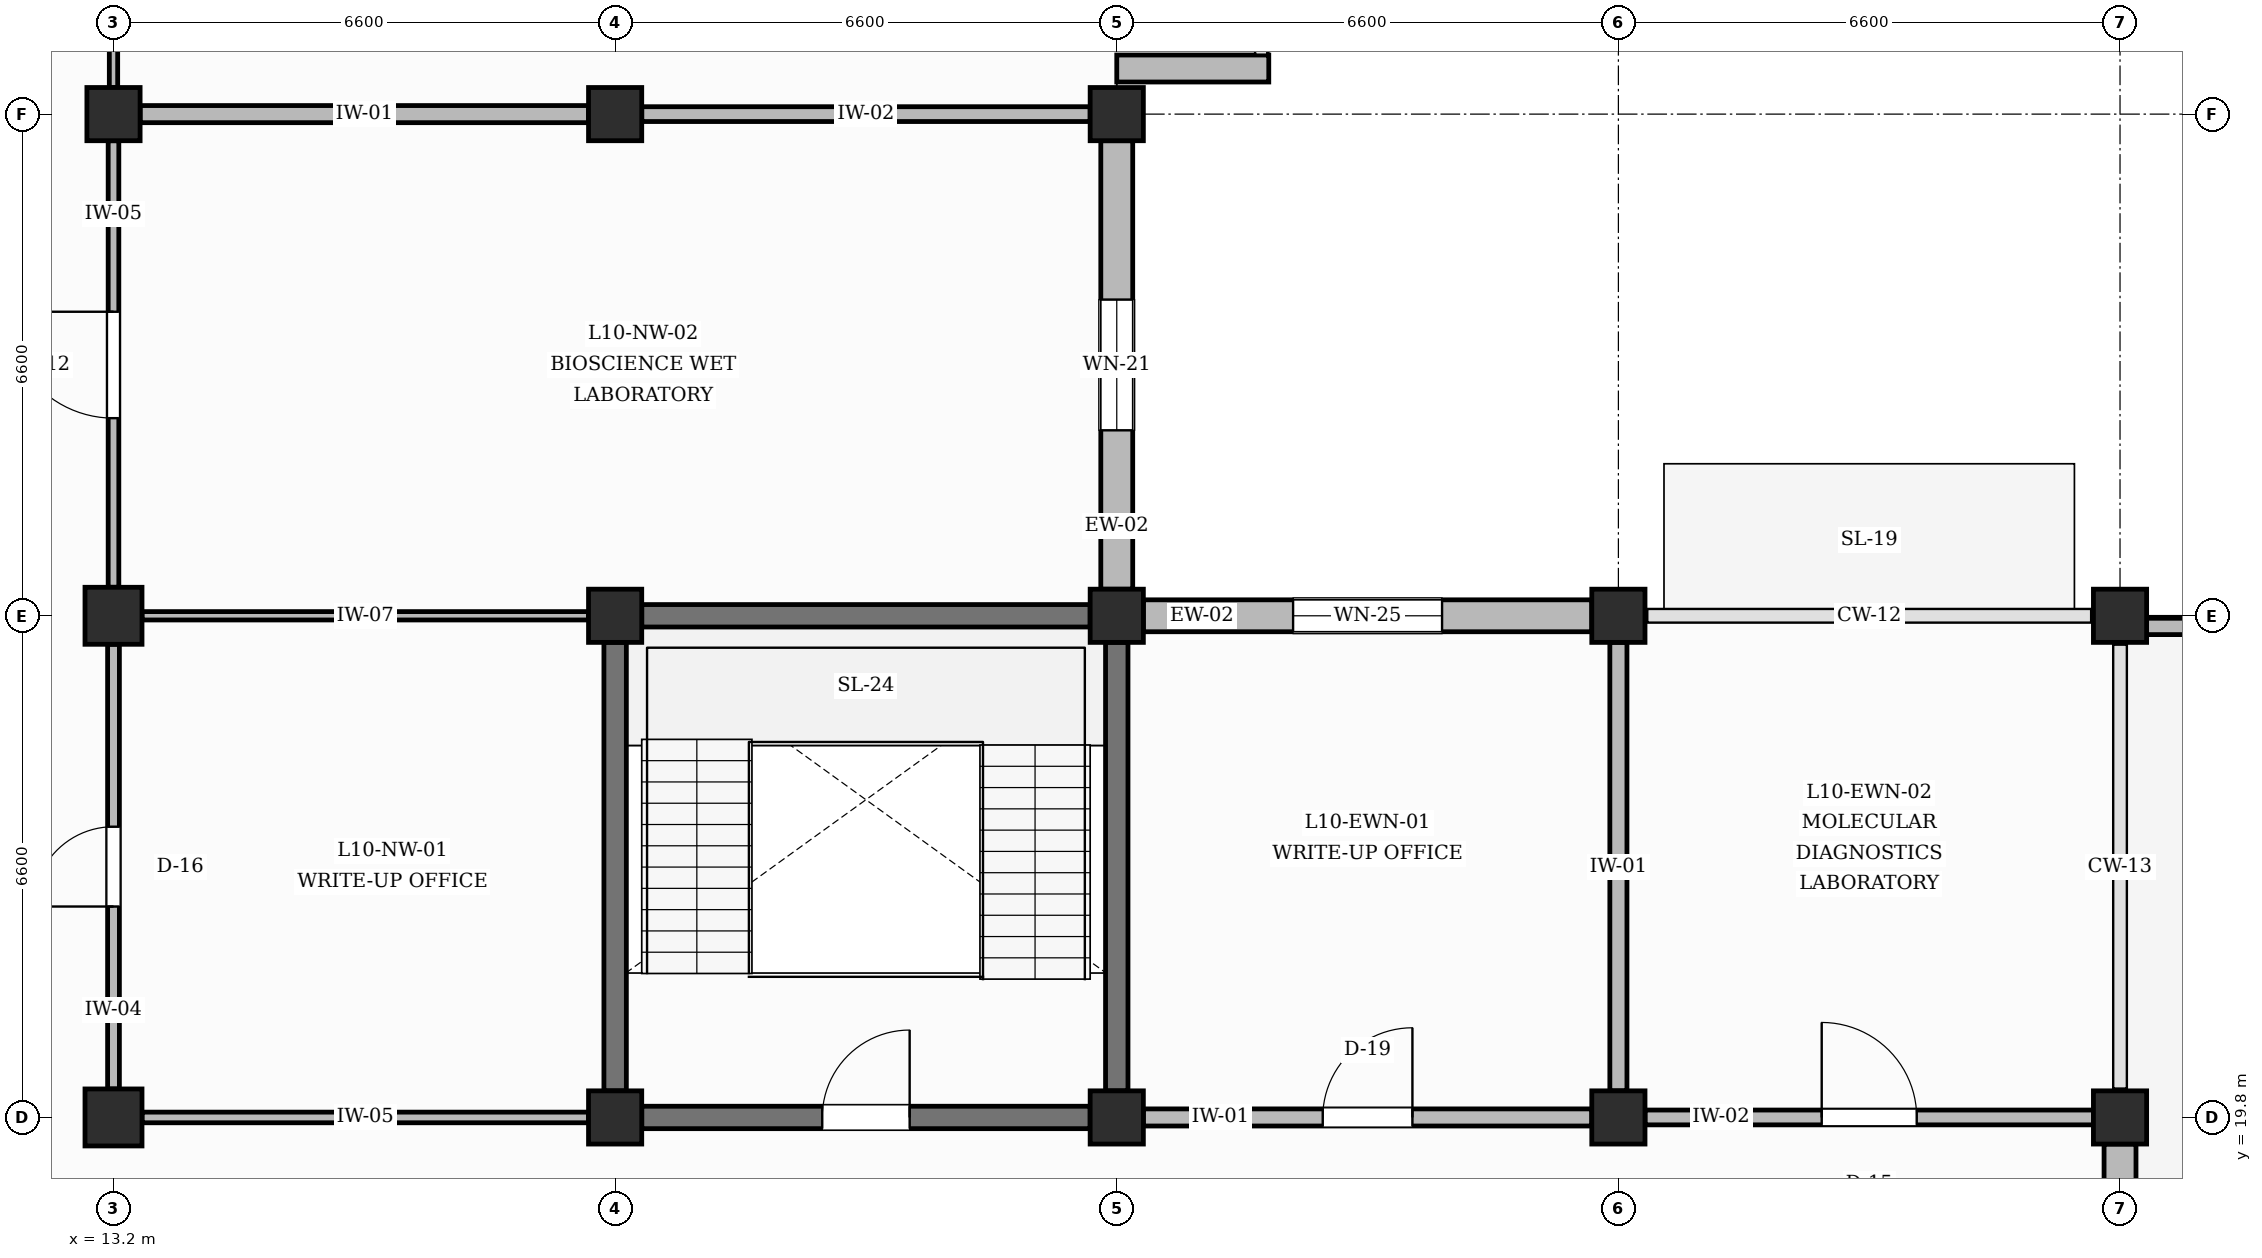
"""IFC4 building model, lengths in metres.
Left out: names, types, materials, properties, quantities, classifications, styles, units other than length and angle.
Written with IfcOpenShell. Run it as: python <this file> out.ifc"""

import sys

from ifc_helpers import new_model, si_unit, direction, frame, frame_2d, origin, origin_2d, place, context, subcontext, project, spatial, rectangle, extrude, element, fill, save


model = new_model("IFC4")
c1 = context("Model", 3, precision=1e-05, world=origin(), true_north=direction((0.0, 1.0)))
c2 = subcontext(c1, "Body", "Model", "MODEL_VIEW")
j1 = project(units=[si_unit("LENGTHUNIT", "METRE"), si_unit("PLANEANGLEUNIT", "RADIAN")], contexts=[c1])
p1 = place(None, origin())
s1 = spatial("IfcSite", under=j1, at=p1, CompositionType="ELEMENT")
p2 = place(p1, origin())
s2 = spatial("IfcBuilding", under=s1, at=p2, CompositionType="ELEMENT")
p3 = place(p2, frame((0.0, 0.0, 43.8)))
s3 = spatial("IfcBuildingStorey", under=s2, at=p3, CompositionType="ELEMENT", Elevation=43.8)
for number, where, z_axis, x_axis in (
    (1, (13.2, 19.8, 0.0), (0.0, 0.0, 1.0), (1.0, 0.0, 0.0)),
    (2, (13.2, 26.4, 0.0), (0.0, 0.0, 1.0), (1.0, 0.0, 0.0)),
):
    element("IfcColumn", number, at=place(p3, frame(where, z_axis=z_axis, x_axis=x_axis)), inside=s3, PredefinedType="COLUMN", context=c2, shape_type="SweptSolid", body=[
        extrude(rectangle(XDim=0.75, YDim=0.75, at=origin_2d()), origin(), (0.0, 0.0, 1.0), 4.2),
    ])
for number, where, z_axis, x_axis in (
    (3, (13.2, 33.0, 0.0), (0.0, 0.0, 1.0), (1.0, 0.0, 0.0)),
    (4, (19.8, 19.8, 0.0), (0.0, 0.0, 1.0), (1.0, 0.0, 0.0)),
    (5, (19.8, 26.4, 0.0), (0.0, 0.0, 1.0), (1.0, 0.0, 0.0)),
    (6, (19.8, 33.0, 0.0), (0.0, 0.0, 1.0), (1.0, 0.0, 0.0)),
    (7, (26.4, 19.8, 0.0), (0.0, 0.0, 1.0), (1.0, 0.0, 0.0)),
    (8, (26.4, 26.4, 0.0), (0.0, 0.0, 1.0), (1.0, 0.0, 0.0)),
    (9, (26.4, 33.0, 0.0), (0.0, 0.0, 1.0), (1.0, 0.0, 0.0)),
    (10, (33.0, 19.8, 0.0), (0.0, 0.0, 1.0), (1.0, 0.0, 0.0)),
    (11, (33.0, 26.4, 0.0), (0.0, 0.0, 1.0), (1.0, 0.0, 0.0)),
    (12, (39.6, 19.8, 0.0), (0.0, 0.0, 1.0), (1.0, 0.0, 0.0)),
    (13, (39.6, 26.4, 0.0), (0.0, 0.0, 1.0), (1.0, 0.0, 0.0)),
):
    element("IfcColumn", number, at=place(p3, frame(where, z_axis=z_axis, x_axis=x_axis)), inside=s3, PredefinedType="COLUMN", context=c2, shape_type="SweptSolid", body=[
        extrude(rectangle(XDim=0.7, YDim=0.7, at=origin_2d()), origin(), (0.0, 0.0, 1.0), 4.2),
    ])
p4 = place(p3, frame((26.4, 26.75, 0.0), z_axis=(0.0, 0.0, 1.0), x_axis=(0.0, 1.0, 0.0)))
e14 = element("IfcWall", 14, at=p4, inside=s3, PredefinedType="SOLIDWALL", context=c2, shape_type="SweptSolid", body=[
    extrude(rectangle(XDim=5.9, YDim=0.42, at=frame_2d((2.95, 0.0))), origin(), (0.0, 0.0, 1.0), 3.29),
])
p5 = place(p4, frame((2.09, 0.0, 0.95)))
e15 = element("IfcOpeningElement", 15, at=p5, cuts=e14, PredefinedType="OPENING", context=c2, shape_type="SweptSolid", body=[
    extrude(rectangle(XDim=1.72, YDim=1.3, at=frame_2d((0.86, 0.65))), frame((0.0, 0.22, 0.0), z_axis=(0.0, -1.0, 0.0), x_axis=(1.0, 0.0, 0.0)), (0.0, 0.0, 1.0), 0.44),
])
p6 = place(p3, frame((26.4, 33.6, 0.0), z_axis=(0.0, 0.0, 1.0), x_axis=(1.0, 0.0, 0.0)))
e16 = element("IfcWall", 16, at=p6, inside=s3, PredefinedType="SOLIDWALL", context=c2, shape_type="SweptSolid", body=[
    extrude(rectangle(XDim=2.0, YDim=0.355, at=frame_2d((1.0, 0.0))), origin(), (0.0, 0.0, 1.0), 3.29),
])
p7 = place(p3, frame((26.75, 26.4, 0.0), z_axis=(0.0, 0.0, 1.0), x_axis=(1.0, 0.0, 0.0)))
e17 = element("IfcWall", 17, at=p7, inside=s3, PredefinedType="SOLIDWALL", context=c2, shape_type="SweptSolid", body=[
    extrude(rectangle(XDim=5.9, YDim=0.42, at=frame_2d((2.95, 0.0))), origin(), (0.0, 0.0, 1.0), 3.29),
])
p8 = place(p7, frame((1.97, 0.0, 0.95)))
e18 = element("IfcOpeningElement", 18, at=p8, cuts=e17, PredefinedType="OPENING", context=c2, shape_type="SweptSolid", body=[
    extrude(rectangle(XDim=1.96, YDim=1.3, at=frame_2d((0.98, 0.65))), frame((0.0, 0.22, 0.0), z_axis=(0.0, -1.0, 0.0), x_axis=(1.0, 0.0, 0.0)), (0.0, 0.0, 1.0), 0.44),
])
p9 = place(p3, frame((39.6, 13.55, 0.0), z_axis=(0.0, 0.0, 1.0), x_axis=(0.0, 1.0, 0.0)))
e19 = element("IfcWall", 19, at=p9, inside=s3, PredefinedType="SOLIDWALL", context=c2, shape_type="SweptSolid", body=[
    extrude(rectangle(XDim=5.9, YDim=0.42, at=frame_2d((2.95, 0.0))), origin(), (0.0, 0.0, 1.0), 3.29),
])
p10 = place(p9, frame((1.97, 0.0, 0.95)))
e20 = element("IfcOpeningElement", 20, at=p10, cuts=e19, PredefinedType="OPENING", context=c2, shape_type="SweptSolid", body=[
    extrude(rectangle(XDim=1.96, YDim=1.74, at=frame_2d((0.98, 0.87))), frame((0.0, 0.22, 0.0), z_axis=(0.0, -1.0, 0.0), x_axis=(1.0, 0.0, 0.0)), (0.0, 0.0, 1.0), 0.44),
])
p11 = place(p3, frame((39.74, 26.26, 0.0), z_axis=(0.0, 0.0, 1.0), x_axis=(1.0, 0.0, 0.0)))
e21 = element("IfcWall", 21, at=p11, inside=s3, PredefinedType="PARAPET", context=c2, shape_type="SweptSolid", body=[
    extrude(rectangle(XDim=6.32, YDim=0.215, at=frame_2d((3.16, 0.0))), origin(), (0.0, 0.0, 1.0), 1.15),
])
p12 = place(p3, frame((20.15, 19.8, 0.0), z_axis=(0.0, 0.0, 1.0), x_axis=(1.0, 0.0, 0.0)))
e22 = element("IfcWall", 22, at=p12, inside=s3, PredefinedType="SHEAR", context=c2, shape_type="SweptSolid", body=[
    extrude(rectangle(XDim=5.9, YDim=0.295, at=frame_2d((2.95, 0.0))), origin(), (0.0, 0.0, 1.0), 3.29),
])
p13 = place(p12, frame((2.375, 0.0, 0.0)))
e23 = element("IfcOpeningElement", 23, at=p13, cuts=e22, PredefinedType="OPENING", context=c2, shape_type="SweptSolid", body=[
    extrude(rectangle(XDim=1.15, YDim=2.2, at=frame_2d((0.575, 1.1))), frame((0.0, 0.157, 0.0), z_axis=(0.0, -1.0, 0.0), x_axis=(1.0, 0.0, 0.0)), (0.0, 0.0, 1.0), 0.315),
])
for number, where, z_axis, x_axis in (
    (24, (20.15, 26.4, 0.0), (0.0, 0.0, 1.0), (1.0, 0.0, 0.0)),
    (25, (19.8, 20.15, 0.0), (0.0, 0.0, 1.0), (0.0, 1.0, 0.0)),
    (26, (26.4, 20.15, 0.0), (0.0, 0.0, 1.0), (0.0, 1.0, 0.0)),
):
    element("IfcWall", number, at=place(p3, frame(where, z_axis=z_axis, x_axis=x_axis)), inside=s3, PredefinedType="SHEAR", context=c2, shape_type="SweptSolid", body=[
        extrude(rectangle(XDim=5.9, YDim=0.295, at=frame_2d((2.95, 0.0))), origin(), (0.0, 0.0, 1.0), 3.29),
    ])
p14 = place(p3, frame((13.2, 20.175, 0.0), z_axis=(0.0, 0.0, 1.0), x_axis=(0.0, 1.0, 0.0)))
e27 = element("IfcWall", 27, at=p14, inside=s3, PredefinedType="PARTITIONING", context=c2, shape_type="SweptSolid", body=[
    extrude(rectangle(XDim=5.85, YDim=0.155, at=frame_2d((2.925, 0.0))), origin(), (0.0, 0.0, 1.0), 3.29),
])
p15 = place(p14, frame((2.4, 0.0, 0.0)))
e28 = element("IfcOpeningElement", 28, at=p15, cuts=e27, PredefinedType="OPENING", context=c2, shape_type="SweptSolid", body=[
    extrude(rectangle(XDim=1.05, YDim=2.15, at=frame_2d((0.525, 1.075))), frame((0.0, 0.087, 0.0), z_axis=(0.0, -1.0, 0.0), x_axis=(1.0, 0.0, 0.0)), (0.0, 0.0, 1.0), 0.175),
])
p16 = place(p3, frame((13.2, 26.775, 0.0), z_axis=(0.0, 0.0, 1.0), x_axis=(0.0, 1.0, 0.0)))
e29 = element("IfcWall", 29, at=p16, inside=s3, PredefinedType="PARTITIONING", context=c2, shape_type="SweptSolid", body=[
    extrude(rectangle(XDim=5.875, YDim=0.14, at=frame_2d((2.938, 0.0))), origin(), (0.0, 0.0, 1.0), 3.29),
])
p17 = place(p16, frame((2.225, 0.0, 0.0)))
e30 = element("IfcOpeningElement", 30, at=p17, cuts=e29, PredefinedType="OPENING", context=c2, shape_type="SweptSolid", body=[
    extrude(rectangle(XDim=1.4, YDim=2.25, at=frame_2d((0.7, 1.125))), frame((0.0, 0.08, 0.0), z_axis=(0.0, -1.0, 0.0), x_axis=(1.0, 0.0, 0.0)), (0.0, 0.0, 1.0), 0.16),
])
p18 = place(p3, frame((13.2, 33.35, 0.0), z_axis=(0.0, 0.0, 1.0), x_axis=(0.0, 1.0, 0.0)))
e31 = element("IfcWall", 31, at=p18, inside=s3, PredefinedType="PARTITIONING", context=c2, shape_type="SweptSolid", body=[
    extrude(rectangle(XDim=5.9, YDim=0.11, at=frame_2d((2.95, 0.0))), origin(), (0.0, 0.0, 1.0), 3.29),
])
p19 = place(p18, frame((2.275, 0.0, 0.0)))
e32 = element("IfcOpeningElement", 32, at=p19, cuts=e31, PredefinedType="OPENING", context=c2, shape_type="SweptSolid", body=[
    extrude(rectangle(XDim=1.35, YDim=2.3, at=frame_2d((0.675, 1.15))), frame((0.0, 0.065, 0.0), z_axis=(0.0, -1.0, 0.0), x_axis=(1.0, 0.0, 0.0)), (0.0, 0.0, 1.0), 0.13),
])
p20 = place(p3, frame((13.575, 19.8, 0.0), z_axis=(0.0, 0.0, 1.0), x_axis=(1.0, 0.0, 0.0)))
e33 = element("IfcWall", 33, at=p20, inside=s3, PredefinedType="PARTITIONING", context=c2, shape_type="SweptSolid", body=[
    extrude(rectangle(XDim=5.875, YDim=0.14, at=frame_2d((2.938, 0.0))), origin(), (0.0, 0.0, 1.0), 3.29),
])
p21 = place(p3, frame((13.575, 26.4, 0.0), z_axis=(0.0, 0.0, 1.0), x_axis=(1.0, 0.0, 0.0)))
e34 = element("IfcWall", 34, at=p21, inside=s3, PredefinedType="PARTITIONING", context=c2, shape_type="SweptSolid", body=[
    extrude(rectangle(XDim=5.875, YDim=0.11, at=frame_2d((2.938, 0.0))), origin(), (0.0, 0.0, 1.0), 3.29),
])
p22 = place(p3, frame((13.55, 33.0, 0.0), z_axis=(0.0, 0.0, 1.0), x_axis=(1.0, 0.0, 0.0)))
e35 = element("IfcWall", 35, at=p22, inside=s3, PredefinedType="PARTITIONING", context=c2, shape_type="SweptSolid", body=[
    extrude(rectangle(XDim=5.9, YDim=0.225, at=frame_2d((2.95, 0.0))), origin(), (0.0, 0.0, 1.0), 3.29),
])
p23 = place(p3, frame((20.15, 33.0, 0.0), z_axis=(0.0, 0.0, 1.0), x_axis=(1.0, 0.0, 0.0)))
e36 = element("IfcWall", 36, at=p23, inside=s3, PredefinedType="PARTITIONING", context=c2, shape_type="SweptSolid", body=[
    extrude(rectangle(XDim=5.9, YDim=0.195, at=frame_2d((2.95, 0.0))), origin(), (0.0, 0.0, 1.0), 3.44),
])
p24 = place(p3, frame((26.75, 19.8, 0.0), z_axis=(0.0, 0.0, 1.0), x_axis=(1.0, 0.0, 0.0)))
e37 = element("IfcWall", 37, at=p24, inside=s3, PredefinedType="PARTITIONING", context=c2, shape_type="SweptSolid", body=[
    extrude(rectangle(XDim=5.9, YDim=0.225, at=frame_2d((2.95, 0.0))), origin(), (0.0, 0.0, 1.0), 3.29),
])
p25 = place(p24, frame((2.36, 0.0, 0.0)))
e38 = element("IfcOpeningElement", 38, at=p25, cuts=e37, PredefinedType="OPENING", context=c2, shape_type="SweptSolid", body=[
    extrude(rectangle(XDim=1.18, YDim=2.2, at=frame_2d((0.59, 1.1))), frame((0.0, 0.123, 0.0), z_axis=(0.0, -1.0, 0.0), x_axis=(1.0, 0.0, 0.0)), (0.0, 0.0, 1.0), 0.245),
])
p26 = place(p3, frame((33.0, 20.15, 0.0), z_axis=(0.0, 0.0, 1.0), x_axis=(0.0, 1.0, 0.0)))
e39 = element("IfcWall", 39, at=p26, inside=s3, PredefinedType="PARTITIONING", context=c2, shape_type="SweptSolid", body=[
    extrude(rectangle(XDim=5.9, YDim=0.225, at=frame_2d((2.95, 0.0))), origin(), (0.0, 0.0, 1.0), 3.29),
])
p27 = place(p3, frame((33.35, 19.8, 0.0), z_axis=(0.0, 0.0, 1.0), x_axis=(1.0, 0.0, 0.0)))
e40 = element("IfcWall", 40, at=p27, inside=s3, PredefinedType="PARTITIONING", context=c2, shape_type="SweptSolid", body=[
    extrude(rectangle(XDim=5.9, YDim=0.195, at=frame_2d((2.95, 0.0))), origin(), (0.0, 0.0, 1.0), 3.29),
])
p28 = place(p27, frame((2.325, 0.0, 0.0)))
e41 = element("IfcOpeningElement", 41, at=p28, cuts=e40, PredefinedType="OPENING", context=c2, shape_type="SweptSolid", body=[
    extrude(rectangle(XDim=1.25, YDim=2.25, at=frame_2d((0.625, 1.125))), frame((0.0, 0.107, 0.0), z_axis=(0.0, -1.0, 0.0), x_axis=(1.0, 0.0, 0.0)), (0.0, 0.0, 1.0), 0.215),
])
p29 = place(p5, origin())
e42 = element("IfcWindow", 42, at=p29, inside=s3, PartitioningType="DOUBLE_PANEL_VERTICAL", PredefinedType="WINDOW", context=c2, shape_type="SweptSolid", body=[
    extrude(rectangle(XDim=1.72, YDim=1.3, at=frame_2d((0.86, 0.65))), frame((0.0, 0.03, 0.0), z_axis=(0.0, -1.0, 0.0), x_axis=(1.0, 0.0, 0.0)), (0.0, 0.0, 1.0), 0.06),
])
fill(e15, e42)
p30 = place(p8, origin())
e43 = element("IfcWindow", 43, at=p30, inside=s3, PartitioningType="DOUBLE_PANEL_VERTICAL", PredefinedType="WINDOW", context=c2, shape_type="SweptSolid", body=[
    extrude(rectangle(XDim=1.96, YDim=1.3, at=frame_2d((0.98, 0.65))), frame((0.0, 0.03, 0.0), z_axis=(0.0, -1.0, 0.0), x_axis=(1.0, 0.0, 0.0)), (0.0, 0.0, 1.0), 0.06),
])
fill(e18, e43)
p31 = place(p13, origin())
e44 = element("IfcDoor", 44, at=p31, inside=s3, OperationType="SINGLE_SWING_RIGHT", PredefinedType="DOOR", context=c2, shape_type="SweptSolid", body=[
    extrude(rectangle(XDim=1.15, YDim=2.2, at=frame_2d((0.575, 1.1))), frame((0.0, 0.025, 0.0), z_axis=(0.0, -1.0, 0.0), x_axis=(1.0, 0.0, 0.0)), (0.0, 0.0, 1.0), 0.05),
])
fill(e23, e44)
p32 = place(p15, origin())
e45 = element("IfcDoor", 45, at=p32, inside=s3, OperationType="SINGLE_SWING_LEFT", PredefinedType="DOOR", context=c2, shape_type="SweptSolid", body=[
    extrude(rectangle(XDim=1.05, YDim=2.15, at=frame_2d((0.525, 1.075))), frame((0.0, 0.025, 0.0), z_axis=(0.0, -1.0, 0.0), x_axis=(1.0, 0.0, 0.0)), (0.0, 0.0, 1.0), 0.05),
])
fill(e28, e45)
p33 = place(p17, origin())
e46 = element("IfcDoor", 46, at=p33, inside=s3, OperationType="SINGLE_SWING_RIGHT", PredefinedType="DOOR", context=c2, shape_type="SweptSolid", body=[
    extrude(rectangle(XDim=1.4, YDim=2.25, at=frame_2d((0.7, 1.125))), frame((0.0, 0.025, 0.0), z_axis=(0.0, -1.0, 0.0), x_axis=(1.0, 0.0, 0.0)), (0.0, 0.0, 1.0), 0.05),
])
fill(e30, e46)
p34 = place(p25, origin())
e47 = element("IfcDoor", 47, at=p34, inside=s3, OperationType="SINGLE_SWING_RIGHT", PredefinedType="DOOR", context=c2, shape_type="SweptSolid", body=[
    extrude(rectangle(XDim=1.18, YDim=2.2, at=frame_2d((0.59, 1.1))), frame((0.0, 0.025, 0.0), z_axis=(0.0, -1.0, 0.0), x_axis=(1.0, 0.0, 0.0)), (0.0, 0.0, 1.0), 0.05),
])
fill(e38, e47)
p35 = place(p28, origin())
e48 = element("IfcDoor", 48, at=p35, inside=s3, OperationType="SINGLE_SWING_LEFT", PredefinedType="DOOR", context=c2, shape_type="SweptSolid", body=[
    extrude(rectangle(XDim=1.25, YDim=2.25, at=frame_2d((0.625, 1.125))), frame((0.0, 0.025, 0.0), z_axis=(0.0, -1.0, 0.0), x_axis=(1.0, 0.0, 0.0)), (0.0, 0.0, 1.0), 0.05),
])
fill(e41, e48)
save(model, sys.argv[1])
